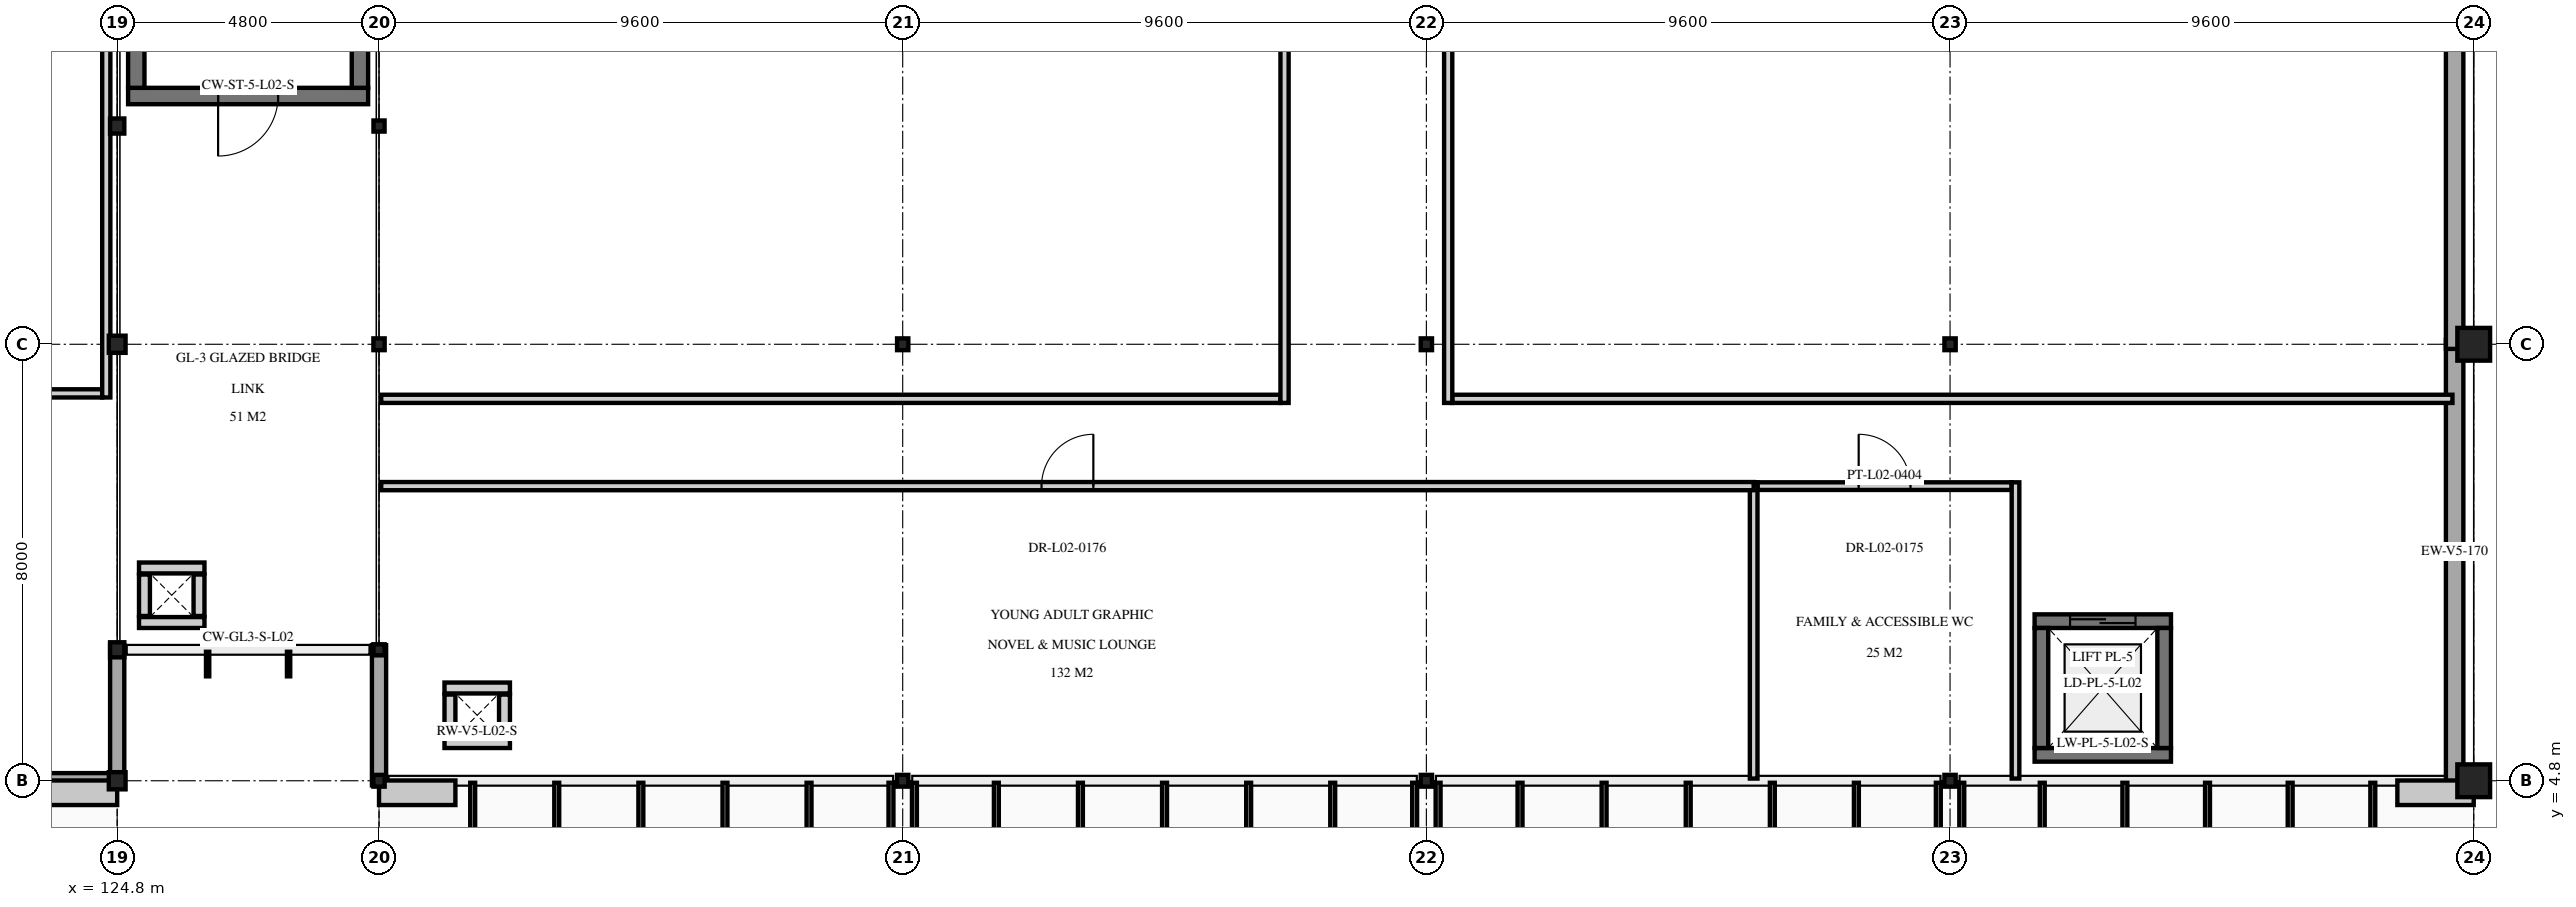
"""IFC4 building model, lengths in metres.
Left out: names, types, materials, properties, quantities, classifications, styles, units other than length and angle.
Written with IfcOpenShell. Run it as: python <this file> out.ifc"""

import sys

from ifc_helpers import new_model, si_unit, direction, frame, frame_2d, origin, origin_2d, place, context, subcontext, project, spatial, rectangle, i_section, extrude, element, fill, save


model = new_model("IFC4")
c1 = context("Model", 3, precision=1e-05, world=origin(), true_north=direction((0.0, 1.0)))
c2 = subcontext(c1, "Body", "Model", "MODEL_VIEW")
j1 = project(units=[si_unit("LENGTHUNIT", "METRE"), si_unit("PLANEANGLEUNIT", "RADIAN")], contexts=[c1])
p1 = place(None, origin())
s1 = spatial("IfcSite", under=j1, at=p1, CompositionType="ELEMENT")
p2 = place(p1, origin())
s2 = spatial("IfcBuilding", under=s1, at=p2, CompositionType="ELEMENT")
p3 = place(p2, frame((0.0, 0.0, 9.6)))
s3 = spatial("IfcBuildingStorey", under=s2, at=p3, CompositionType="ELEMENT", Elevation=9.6)
for number, where, z_axis, x_axis in (
    (1, (124.8, 4.8, 0.0), (0.0, 0.0, 1.0), (1.0, 0.0, 0.0)),
    (2, (124.8, 12.8, 0.0), (0.0, 0.0, 1.0), (1.0, 0.0, 0.0)),
):
    element("IfcColumn", number, at=place(p3, frame(where, z_axis=z_axis, x_axis=x_axis)), inside=s3, PredefinedType="COLUMN", context=c2, shape_type="SweptSolid", body=[
        extrude(i_section(OverallWidth=0.307, OverallDepth=0.314, WebThickness=0.012, FlangeThickness=0.019, at=origin_2d()), origin(), (0.0, 0.0, 1.0), 4.5),
    ])
for number, where, z_axis, x_axis in (
    (3, (124.8, 7.2, 0.0), (0.0, 0.0, 1.0), (1.0, 0.0, 0.0)),
    (4, (124.8, 16.8, 0.0), (0.0, 0.0, 1.0), (1.0, 0.0, 0.0)),
):
    element("IfcColumn", number, at=place(p3, frame(where, z_axis=z_axis, x_axis=x_axis)), inside=s3, PredefinedType="COLUMN", context=c2, shape_type="SweptSolid", body=[
        extrude(i_section(OverallWidth=0.261, OverallDepth=0.276, WebThickness=0.015, FlangeThickness=0.025, at=origin_2d()), origin(), (0.0, 0.0, 1.0), 4.5),
    ])
for number, where, z_axis, x_axis in (
    (5, (129.6, 4.8, 0.0), (0.0, 0.0, 1.0), (1.0, 0.0, 0.0)),
    (6, (129.6, 12.8, 0.0), (0.0, 0.0, 1.0), (1.0, 0.0, 0.0)),
    (7, (139.2, 4.8, 0.0), (0.0, 0.0, 1.0), (1.0, 0.0, 0.0)),
    (8, (139.2, 12.8, 0.0), (0.0, 0.0, 1.0), (1.0, 0.0, 0.0)),
    (9, (148.8, 4.8, 0.0), (0.0, 0.0, 1.0), (1.0, 0.0, 0.0)),
    (10, (148.8, 12.8, 0.0), (0.0, 0.0, 1.0), (1.0, 0.0, 0.0)),
    (11, (158.4, 4.8, 0.0), (0.0, 0.0, 1.0), (1.0, 0.0, 0.0)),
    (12, (158.4, 12.8, 0.0), (0.0, 0.0, 1.0), (1.0, 0.0, 0.0)),
):
    element("IfcColumn", number, at=place(p3, frame(where, z_axis=z_axis, x_axis=x_axis)), inside=s3, PredefinedType="COLUMN", context=c2, shape_type="SweptSolid", body=[
        extrude(i_section(OverallWidth=0.206, OverallDepth=0.216, WebThickness=0.01, FlangeThickness=0.017, at=origin_2d()), origin(), (0.0, 0.0, 1.0), 4.5),
    ])
for number, where, z_axis, x_axis in (
    (13, (168.0, 4.8, 0.0), (0.0, 0.0, 1.0), (1.0, 0.0, 0.0)),
    (14, (168.0, 12.8, 0.0), (0.0, 0.0, 1.0), (1.0, 0.0, 0.0)),
):
    element("IfcColumn", number, at=place(p3, frame(where, z_axis=z_axis, x_axis=x_axis)), inside=s3, PredefinedType="COLUMN", context=c2, shape_type="SweptSolid", body=[
        extrude(rectangle(XDim=0.6, YDim=0.6, at=origin_2d()), origin(), (0.0, 0.0, 1.0), 3.793),
    ])
for number, where, z_axis, x_axis in (
    (15, (129.6, 7.2, 0.0), (0.0, 0.0, 1.0), (1.0, 0.0, 0.0)),
    (16, (129.6, 16.8, 0.0), (0.0, 0.0, 1.0), (1.0, 0.0, 0.0)),
):
    element("IfcColumn", number, at=place(p3, frame(where, z_axis=z_axis, x_axis=x_axis)), inside=s3, PredefinedType="COLUMN", context=c2, shape_type="SweptSolid", body=[
        extrude(i_section(OverallWidth=0.204, OverallDepth=0.203, WebThickness=0.007, FlangeThickness=0.011, at=origin_2d()), origin(), (0.0, 0.0, 1.0), 4.5),
    ])
p4 = place(p3, frame((129.4, 17.35, 0.0), z_axis=(0.0, 0.0, 1.0), x_axis=(-1.0, 0.0, 0.0)))
e17 = element("IfcWall", 17, at=p4, inside=s3, PredefinedType="SHEAR", context=c2, shape_type="SweptSolid", body=[
    extrude(rectangle(XDim=4.4, YDim=0.3, at=frame_2d((2.2, 0.0))), origin(), (0.0, 0.0, 1.0), 4.255),
])
p5 = place(p4, frame((1.65, 0.0, 0.0)))
e18 = element("IfcOpeningElement", 18, at=p5, cuts=e17, PredefinedType="OPENING", context=c2, shape_type="SweptSolid", body=[
    extrude(rectangle(XDim=1.1, YDim=2.2, at=frame_2d((0.55, 1.1))), frame((0.0, 0.16, 0.0), z_axis=(0.0, -1.0, 0.0), x_axis=(1.0, 0.0, 0.0)), (0.0, 0.0, 1.0), 0.32),
])
for number, where, z_axis, x_axis in (
    (19, (125.15, 17.5, 0.0), (0.0, 0.0, 1.0), (0.0, 1.0, 0.0)),
    (20, (129.25, 25.3, 0.0), (0.0, 0.0, 1.0), (0.0, -1.0, 0.0)),
):
    element("IfcWall", number, at=place(p3, frame(where, z_axis=z_axis, x_axis=x_axis)), inside=s3, PredefinedType="SHEAR", context=c2, shape_type="SweptSolid", body=[
        extrude(rectangle(XDim=7.8, YDim=0.3, at=frame_2d((3.9, 0.0))), origin(), (0.0, 0.0, 1.0), 4.255),
    ])
p6 = place(p3, frame((162.45, 5.275, 0.0), z_axis=(0.0, 0.0, 1.0), x_axis=(-1.0, 0.0, 0.0)))
e21 = element("IfcWall", 21, at=p6, inside=s3, PredefinedType="SHEAR", context=c2, shape_type="SweptSolid", body=[
    extrude(rectangle(XDim=2.5, YDim=0.25, at=frame_2d((1.25, 0.0))), origin(), (0.0, 0.0, 1.0), 5.636),
])
p7 = place(p3, frame((159.95, 7.725, 0.0), z_axis=(0.0, 0.0, 1.0), x_axis=(1.0, 0.0, 0.0)))
e22 = element("IfcWall", 22, at=p7, inside=s3, PredefinedType="SHEAR", context=c2, shape_type="SweptSolid", body=[
    extrude(rectangle(XDim=2.5, YDim=0.25, at=frame_2d((1.25, 0.0))), origin(), (0.0, 0.0, 1.0), 5.636),
])
p8 = place(p7, frame((0.65, 0.0, 0.0)))
e23 = element("IfcOpeningElement", 23, at=p8, cuts=e22, PredefinedType="OPENING", context=c2, shape_type="SweptSolid", body=[
    extrude(rectangle(XDim=1.2, YDim=2.2, at=frame_2d((0.6, 1.1))), frame((0.0, 0.135, 0.0), z_axis=(0.0, -1.0, 0.0), x_axis=(1.0, 0.0, 0.0)), (0.0, 0.0, 1.0), 0.27),
])
p9 = place(p3, frame((160.075, 5.4, 0.0), z_axis=(0.0, 0.0, 1.0), x_axis=(0.0, 1.0, 0.0)))
e24 = element("IfcWall", 24, at=p9, inside=s3, PredefinedType="SHEAR", context=c2, shape_type="SweptSolid", body=[
    extrude(rectangle(XDim=2.2, YDim=0.25, at=frame_2d((1.1, 0.0))), origin(), (0.0, 0.0, 1.0), 6.229),
])
p10 = place(p3, frame((162.325, 7.6, 0.0), z_axis=(0.0, 0.0, 1.0), x_axis=(0.0, -1.0, 0.0)))
e25 = element("IfcWall", 25, at=p10, inside=s3, PredefinedType="SHEAR", context=c2, shape_type="SweptSolid", body=[
    extrude(rectangle(XDim=2.2, YDim=0.25, at=frame_2d((1.1, 0.0))), origin(), (0.0, 0.0, 1.0), 5.667),
])
for number, where, z_axis, x_axis in (
    (26, (132.0, 5.5, 0.0), (0.0, 0.0, 1.0), (-1.0, 0.0, 0.0)),
    (27, (130.8, 6.5, 0.0), (0.0, 0.0, 1.0), (1.0, 0.0, 0.0)),
):
    element("IfcWall", number, at=place(p3, frame(where, z_axis=z_axis, x_axis=x_axis)), inside=s3, PredefinedType="PARTITIONING", context=c2, shape_type="SweptSolid", body=[
        extrude(rectangle(XDim=1.2, YDim=0.2, at=frame_2d((0.6, 0.0))), origin(), (0.0, 0.0, 1.0), 12.798),
    ])
for number, where, z_axis, x_axis in (
    (28, (130.9, 5.62, 0.0), (0.0, 0.0, 1.0), (0.0, 1.0, 0.0)),
    (29, (131.9, 6.38, 0.0), (0.0, 0.0, 1.0), (0.0, -1.0, 0.0)),
):
    element("IfcWall", number, at=place(p3, frame(where, z_axis=z_axis, x_axis=x_axis)), inside=s3, PredefinedType="PARTITIONING", context=c2, shape_type="SweptSolid", body=[
        extrude(rectangle(XDim=0.76, YDim=0.2, at=frame_2d((0.38, 0.0))), origin(), (0.0, 0.0, 1.0), 12.798),
    ])
for number, where, z_axis, x_axis in (
    (30, (126.4, 7.7, 0.0), (0.0, 0.0, 1.0), (-1.0, 0.0, 0.0)),
    (31, (125.2, 8.7, 0.0), (0.0, 0.0, 1.0), (1.0, 0.0, 0.0)),
):
    element("IfcWall", number, at=place(p3, frame(where, z_axis=z_axis, x_axis=x_axis)), inside=s3, PredefinedType="PARTITIONING", context=c2, shape_type="SweptSolid", body=[
        extrude(rectangle(XDim=1.2, YDim=0.2, at=frame_2d((0.6, 0.0))), origin(), (0.0, 0.0, 1.0), 3.755),
    ])
for number, where, z_axis, x_axis in (
    (32, (125.3, 7.82, 0.0), (0.0, 0.0, 1.0), (0.0, 1.0, 0.0)),
    (33, (126.3, 8.58, 0.0), (0.0, 0.0, 1.0), (0.0, -1.0, 0.0)),
):
    element("IfcWall", number, at=place(p3, frame(where, z_axis=z_axis, x_axis=x_axis)), inside=s3, PredefinedType="PARTITIONING", context=c2, shape_type="SweptSolid", body=[
        extrude(rectangle(XDim=0.76, YDim=0.2, at=frame_2d((0.38, 0.0))), origin(), (0.0, 0.0, 1.0), 3.755),
    ])
p11 = place(p3, frame((124.885, 4.8, 0.0), z_axis=(0.0, 0.0, 1.0), x_axis=(-1.0, 0.0, 0.0)))
e34 = element("IfcWall", 34, at=p11, inside=s3, PredefinedType="SOLIDWALL", context=c2, shape_type="SweptSolid", body=[
    extrude(rectangle(XDim=8.17, YDim=0.28, at=frame_2d((4.085, 0.0))), origin(), (0.0, 0.0, 1.0), 3.775),
])
p12 = place(p11, frame((3.185, 0.0, 1.0)))
e35 = element("IfcOpeningElement", 35, at=p12, cuts=e34, PredefinedType="OPENING", context=c2, shape_type="SweptSolid", body=[
    extrude(rectangle(XDim=1.8, YDim=2.1, at=frame_2d((0.9, 1.05))), frame((0.0, 0.15, 0.0), z_axis=(0.0, -1.0, 0.0), x_axis=(1.0, 0.0, 0.0)), (0.0, 0.0, 1.0), 0.3),
])
p13 = place(p3, frame((124.8, 7.285, 0.0), z_axis=(0.0, 0.0, 1.0), x_axis=(0.0, -1.0, 0.0)))
e36 = element("IfcWall", 36, at=p13, inside=s3, PredefinedType="SOLIDWALL", context=c2, shape_type="SweptSolid", body=[
    extrude(rectangle(XDim=2.57, YDim=0.26, at=frame_2d((1.285, 0.0))), origin(), (0.0, 0.0, 1.0), 3.775),
])
for number, where, z_axis, x_axis in (
    (37, (167.65, 12.885, 0.0), (0.0, 0.0, 1.0), (0.0, -1.0, 0.0)),
    (38, (167.65, 20.885, 0.0), (0.0, 0.0, 1.0), (0.0, -1.0, 0.0)),
):
    element("IfcWall", number, at=place(p3, frame(where, z_axis=z_axis, x_axis=x_axis)), inside=s3, PredefinedType="SOLIDWALL", context=c2, shape_type="SweptSolid", body=[
        extrude(rectangle(XDim=8.17, YDim=0.32, at=frame_2d((4.085, 0.0))), origin(), (0.0, 0.0, 1.0), 3.55),
    ])
p14 = place(p3, frame((129.6, 4.715, 0.0), z_axis=(0.0, 0.0, 1.0), x_axis=(0.0, 1.0, 0.0)))
e39 = element("IfcWall", 39, at=p14, inside=s3, PredefinedType="SOLIDWALL", context=c2, shape_type="SweptSolid", body=[
    extrude(rectangle(XDim=2.57, YDim=0.26, at=frame_2d((1.285, 0.0))), origin(), (0.0, 0.0, 1.0), 3.845),
])
p15 = place(p3, frame((107.2, 11.9, 0.0), z_axis=(0.0, 0.0, 1.0), x_axis=(1.0, 0.0, 0.0)))
e40 = element("IfcWall", 40, at=p15, inside=s3, PredefinedType="PARTITIONING", context=c2, shape_type="SweptSolid", body=[
    extrude(rectangle(XDim=17.325, YDim=0.15, at=frame_2d((8.663, 0.0))), origin(), (0.0, 0.0, 1.0), 3.775),
])
p16 = place(p15, frame((7.688, 0.0, 0.0)))
e41 = element("IfcOpeningElement", 41, at=p16, cuts=e40, PredefinedType="OPENING", context=c2, shape_type="SweptSolid", body=[
    extrude(rectangle(XDim=0.95, YDim=2.15, at=frame_2d((0.475, 1.075))), frame((0.0, 0.085, 0.0), z_axis=(0.0, -1.0, 0.0), x_axis=(1.0, 0.0, 0.0)), (0.0, 0.0, 1.0), 0.17),
])
p17 = place(p3, frame((124.6, 11.825, 0.0), z_axis=(0.0, 0.0, 1.0), x_axis=(0.0, 1.0, 0.0)))
e42 = element("IfcWall", 42, at=p17, inside=s3, PredefinedType="PARTITIONING", context=c2, shape_type="SweptSolid", body=[
    extrude(rectangle(XDim=21.735, YDim=0.15, at=frame_2d((10.868, 0.0))), origin(), (0.0, 0.0, 1.0), 3.775),
])
p18 = place(p3, frame((154.87, 10.2, 0.0), z_axis=(0.0, 0.0, 1.0), x_axis=(1.0, 0.0, 0.0)))
e43 = element("IfcWall", 43, at=p18, inside=s3, PredefinedType="PARTITIONING", context=c2, shape_type="SweptSolid", body=[
    extrude(rectangle(XDim=4.66, YDim=0.14, at=frame_2d((2.33, 0.0))), origin(), (0.0, 0.0, 1.0), 6.351),
])
p19 = place(p18, frame((1.855, 0.0, 0.0)))
e44 = element("IfcOpeningElement", 44, at=p19, cuts=e43, PredefinedType="OPENING", context=c2, shape_type="SweptSolid", body=[
    extrude(rectangle(XDim=0.95, YDim=2.1, at=frame_2d((0.475, 1.05))), frame((0.0, 0.08, 0.0), z_axis=(0.0, -1.0, 0.0), x_axis=(1.0, 0.0, 0.0)), (0.0, 0.0, 1.0), 0.16),
])
p20 = place(p3, frame((154.8, 4.84, 0.0), z_axis=(0.0, 0.0, 1.0), x_axis=(0.0, 1.0, 0.0)))
e45 = element("IfcWall", 45, at=p20, inside=s3, PredefinedType="PARTITIONING", context=c2, shape_type="SweptSolid", body=[
    extrude(rectangle(XDim=5.43, YDim=0.14, at=frame_2d((2.715, 0.0))), origin(), (0.0, 0.0, 1.0), 5.9),
])
p21 = place(p3, frame((159.6, 4.84, 0.0), z_axis=(0.0, 0.0, 1.0), x_axis=(0.0, 1.0, 0.0)))
e46 = element("IfcWall", 46, at=p21, inside=s3, PredefinedType="PARTITIONING", context=c2, shape_type="SweptSolid", body=[
    extrude(rectangle(XDim=5.43, YDim=0.14, at=frame_2d((2.715, 0.0))), origin(), (0.0, 0.0, 1.0), 3.55),
])
p22 = place(p3, frame((129.64, 10.2, 0.0), z_axis=(0.0, 0.0, 1.0), x_axis=(1.0, 0.0, 0.0)))
e47 = element("IfcWall", 47, at=p22, inside=s3, PredefinedType="PARTITIONING", context=c2, shape_type="SweptSolid", body=[
    extrude(rectangle(XDim=25.16, YDim=0.15, at=frame_2d((12.58, 0.0))), origin(), (0.0, 0.0, 1.0), 3.905),
])
p23 = place(p22, frame((12.105, 0.0, 0.0)))
e48 = element("IfcOpeningElement", 48, at=p23, cuts=e47, PredefinedType="OPENING", context=c2, shape_type="SweptSolid", body=[
    extrude(rectangle(XDim=0.95, YDim=2.15, at=frame_2d((0.475, 1.075))), frame((0.0, 0.085, 0.0), z_axis=(0.0, -1.0, 0.0), x_axis=(1.0, 0.0, 0.0)), (0.0, 0.0, 1.0), 0.17),
])
p24 = place(p3, frame((129.64, 11.8, 0.0), z_axis=(0.0, 0.0, 1.0), x_axis=(1.0, 0.0, 0.0)))
e49 = element("IfcWall", 49, at=p24, inside=s3, PredefinedType="PARTITIONING", context=c2, shape_type="SweptSolid", body=[
    extrude(rectangle(XDim=16.485, YDim=0.15, at=frame_2d((8.243, 0.0))), origin(), (0.0, 0.0, 1.0), 3.905),
])
p25 = place(p3, frame((146.2, 11.725, 0.0), z_axis=(0.0, 0.0, 1.0), x_axis=(0.0, 1.0, 0.0)))
e50 = element("IfcWall", 50, at=p25, inside=s3, PredefinedType="PARTITIONING", context=c2, shape_type="SweptSolid", body=[
    extrude(rectangle(XDim=33.035, YDim=0.15, at=frame_2d((16.518, 0.0))), origin(), (0.0, 0.0, 1.0), 8.3),
])
p26 = place(p25, frame((16.042, 0.0, 0.0)))
e51 = element("IfcOpeningElement", 51, at=p26, cuts=e50, PredefinedType="OPENING", context=c2, shape_type="SweptSolid", body=[
    extrude(rectangle(XDim=0.95, YDim=2.15, at=frame_2d((0.475, 1.075))), frame((0.0, 0.085, 0.0), z_axis=(0.0, -1.0, 0.0), x_axis=(1.0, 0.0, 0.0)), (0.0, 0.0, 1.0), 0.17),
])
p27 = place(p3, frame((149.275, 11.8, 0.0), z_axis=(0.0, 0.0, 1.0), x_axis=(1.0, 0.0, 0.0)))
e52 = element("IfcWall", 52, at=p27, inside=s3, PredefinedType="PARTITIONING", context=c2, shape_type="SweptSolid", body=[
    extrude(rectangle(XDim=18.335, YDim=0.15, at=frame_2d((9.167, 0.0))), origin(), (0.0, 0.0, 1.0), 4.274),
])
p28 = place(p3, frame((149.2, 11.725, 0.0), z_axis=(0.0, 0.0, 1.0), x_axis=(0.0, 1.0, 0.0)))
e53 = element("IfcWall", 53, at=p28, inside=s3, PredefinedType="PARTITIONING", context=c2, shape_type="SweptSolid", body=[
    extrude(rectangle(XDim=18.75, YDim=0.15, at=frame_2d((9.375, 0.0))), origin(), (0.0, 0.0, 1.0), 5.9),
])
p29 = place(p28, frame((10.4, 0.0, 0.0)))
e54 = element("IfcOpeningElement", 54, at=p29, cuts=e53, PredefinedType="OPENING", context=c2, shape_type="SweptSolid", body=[
    extrude(rectangle(XDim=0.95, YDim=2.15, at=frame_2d((0.475, 1.075))), frame((0.0, 0.085, 0.0), z_axis=(0.0, -1.0, 0.0), x_axis=(1.0, 0.0, 0.0)), (0.0, 0.0, 1.0), 0.17),
])
p30 = place(p5, origin())
e55 = element("IfcDoor", 55, at=p30, inside=s3, OperationType="SINGLE_SWING_RIGHT", PredefinedType="DOOR", context=c2, shape_type="SweptSolid", body=[
    extrude(rectangle(XDim=1.1, YDim=2.2, at=frame_2d((0.55, 1.1))), frame((0.0, 0.025, 0.0), z_axis=(0.0, -1.0, 0.0), x_axis=(1.0, 0.0, 0.0)), (0.0, 0.0, 1.0), 0.05),
])
fill(e18, e55)
p31 = place(p8, origin())
e56 = element("IfcDoor", 56, at=p31, inside=s3, OperationType="DOUBLE_DOOR_SLIDING", PredefinedType="DOOR", context=c2, shape_type="SweptSolid", body=[
    extrude(rectangle(XDim=1.2, YDim=2.2, at=frame_2d((0.6, 1.1))), frame((0.0, 0.025, 0.0), z_axis=(0.0, -1.0, 0.0), x_axis=(1.0, 0.0, 0.0)), (0.0, 0.0, 1.0), 0.05),
])
fill(e23, e56)
p32 = place(p19, origin())
e57 = element("IfcDoor", 57, at=p32, inside=s3, OperationType="SINGLE_SWING_LEFT", PredefinedType="DOOR", context=c2, shape_type="SweptSolid", body=[
    extrude(rectangle(XDim=0.95, YDim=2.1, at=frame_2d((0.475, 1.05))), frame((0.0, 0.025, 0.0), z_axis=(0.0, -1.0, 0.0), x_axis=(1.0, 0.0, 0.0)), (0.0, 0.0, 1.0), 0.05),
])
fill(e44, e57)
p33 = place(p23, origin())
e58 = element("IfcDoor", 58, at=p33, inside=s3, OperationType="SINGLE_SWING_RIGHT", PredefinedType="DOOR", context=c2, shape_type="SweptSolid", body=[
    extrude(rectangle(XDim=0.95, YDim=2.15, at=frame_2d((0.475, 1.075))), frame((0.0, 0.025, 0.0), z_axis=(0.0, -1.0, 0.0), x_axis=(1.0, 0.0, 0.0)), (0.0, 0.0, 1.0), 0.05),
])
fill(e48, e58)
save(model, sys.argv[1])
